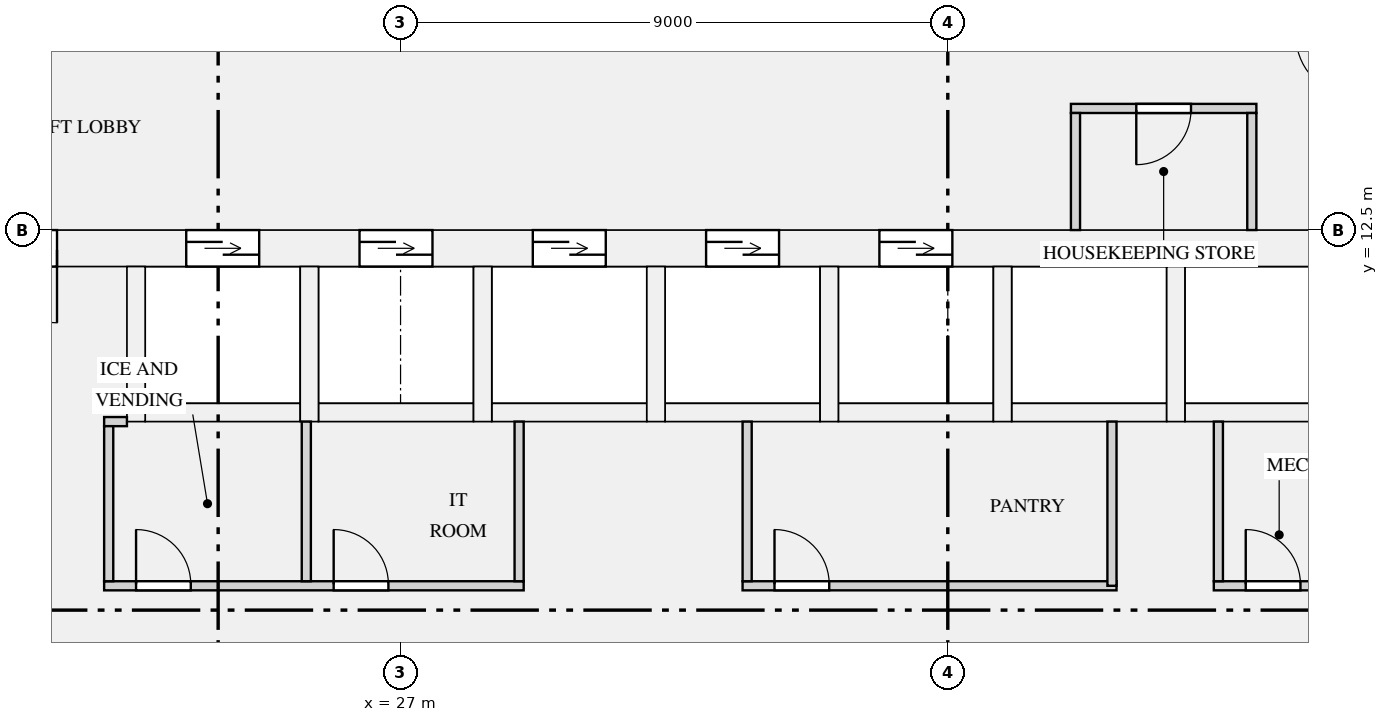
"""IFC4 building model, lengths in metres.
Left out: names, types, materials, properties, quantities, classifications, styles, units other than length and angle.
Written with IfcOpenShell. Run it as: python <this file> out.ifc"""

import sys

from ifc_helpers import new_model, si_unit, direction, frame, frame_2d, origin, place, context, subcontext, project, spatial, rectangle, extrude, element, fill, save


model = new_model("IFC4")
c1 = context("Model", 3, precision=1e-05, world=origin(), true_north=direction((0.0, 1.0)))
c2 = subcontext(c1, "Body", "Model", "MODEL_VIEW")
j1 = project(units=[si_unit("LENGTHUNIT", "METRE"), si_unit("PLANEANGLEUNIT", "RADIAN")], contexts=[c1])
p1 = place(None, origin())
s1 = spatial("IfcSite", under=j1, at=p1, CompositionType="ELEMENT")
p2 = place(p1, origin())
s2 = spatial("IfcBuilding", under=s1, at=p2, CompositionType="ELEMENT")
p3 = place(p2, frame((0.0, 0.0, 38.4)))
s3 = spatial("IfcBuildingStorey", under=s2, at=p3, CompositionType="ELEMENT", Elevation=38.4)
p4 = place(p3, frame((19.0, 12.2, 0.0), z_axis=(0.0, 0.0, 1.0), x_axis=(1.0, 0.0, 0.0)))
e1 = element("IfcWall", 1, at=p4, inside=s3, PredefinedType="SHEAR", context=c2, shape_type="SweptSolid", body=[
    extrude(rectangle(XDim=34.0, YDim=0.6, at=frame_2d((17.0, 0.0))), origin(), (0.0, 0.0, 1.0), 3.15),
])
p5 = place(p4, frame((4.475, 0.0, 0.0)))
e2 = element("IfcOpeningElement", 2, at=p5, cuts=e1, PredefinedType="OPENING", context=c2, shape_type="SweptSolid", body=[
    extrude(rectangle(XDim=1.2, YDim=2.1, at=frame_2d((0.6, 1.05))), frame((0.0, 0.31, 0.0), z_axis=(0.0, -1.0, 0.0), x_axis=(1.0, 0.0, 0.0)), (0.0, 0.0, 1.0), 0.62),
])
p6 = place(p4, frame((7.325, 0.0, 0.0)))
e3 = element("IfcOpeningElement", 3, at=p6, cuts=e1, PredefinedType="OPENING", context=c2, shape_type="SweptSolid", body=[
    extrude(rectangle(XDim=1.2, YDim=2.1, at=frame_2d((0.6, 1.05))), frame((0.0, 0.31, 0.0), z_axis=(0.0, -1.0, 0.0), x_axis=(1.0, 0.0, 0.0)), (0.0, 0.0, 1.0), 0.62),
])
p7 = place(p4, frame((10.175, 0.0, 0.0)))
e4 = element("IfcOpeningElement", 4, at=p7, cuts=e1, PredefinedType="OPENING", context=c2, shape_type="SweptSolid", body=[
    extrude(rectangle(XDim=1.2, YDim=2.1, at=frame_2d((0.6, 1.05))), frame((0.0, 0.31, 0.0), z_axis=(0.0, -1.0, 0.0), x_axis=(1.0, 0.0, 0.0)), (0.0, 0.0, 1.0), 0.62),
])
p8 = place(p4, frame((13.025, 0.0, 0.0)))
e5 = element("IfcOpeningElement", 5, at=p8, cuts=e1, PredefinedType="OPENING", context=c2, shape_type="SweptSolid", body=[
    extrude(rectangle(XDim=1.2, YDim=2.1, at=frame_2d((0.6, 1.05))), frame((0.0, 0.31, 0.0), z_axis=(0.0, -1.0, 0.0), x_axis=(1.0, 0.0, 0.0)), (0.0, 0.0, 1.0), 0.62),
])
p9 = place(p4, frame((15.875, 0.0, 0.0)))
e6 = element("IfcOpeningElement", 6, at=p9, cuts=e1, PredefinedType="OPENING", context=c2, shape_type="SweptSolid", body=[
    extrude(rectangle(XDim=1.2, YDim=2.1, at=frame_2d((0.6, 1.05))), frame((0.0, 0.31, 0.0), z_axis=(0.0, -1.0, 0.0), x_axis=(1.0, 0.0, 0.0)), (0.0, 0.0, 1.0), 0.62),
])
p10 = place(p4, frame((24.175, 0.0, 0.0)))
e7 = element("IfcOpeningElement", 7, at=p10, cuts=e1, PredefinedType="OPENING", context=c2, shape_type="SweptSolid", body=[
    extrude(rectangle(XDim=1.1, YDim=2.1, at=frame_2d((0.55, 1.05))), frame((0.0, 0.31, 0.0), z_axis=(0.0, -1.0, 0.0), x_axis=(1.0, 0.0, 0.0)), (0.0, 0.0, 1.0), 0.62),
])
p11 = place(p4, frame((26.425, 0.0, 0.0)))
e8 = element("IfcOpeningElement", 8, at=p11, cuts=e1, PredefinedType="OPENING", context=c2, shape_type="SweptSolid", body=[
    extrude(rectangle(XDim=1.1, YDim=2.1, at=frame_2d((0.55, 1.05))), frame((0.0, 0.31, 0.0), z_axis=(0.0, -1.0, 0.0), x_axis=(1.0, 0.0, 0.0)), (0.0, 0.0, 1.0), 0.62),
])
p12 = place(p4, frame((28.675, 0.0, 0.0)))
e9 = element("IfcOpeningElement", 9, at=p12, cuts=e1, PredefinedType="OPENING", context=c2, shape_type="SweptSolid", body=[
    extrude(rectangle(XDim=1.1, YDim=2.1, at=frame_2d((0.55, 1.05))), frame((0.0, 0.31, 0.0), z_axis=(0.0, -1.0, 0.0), x_axis=(1.0, 0.0, 0.0)), (0.0, 0.0, 1.0), 0.62),
])
p13 = place(p4, frame((1.15, 0.0, 0.0)))
e10 = element("IfcOpeningElement", 10, at=p13, cuts=e1, PredefinedType="OPENING", context=c2, shape_type="SweptSolid", body=[
    extrude(rectangle(XDim=1.2, YDim=2.1, at=frame_2d((0.6, 1.05))), frame((0.0, 0.31, 0.0), z_axis=(0.0, -1.0, 0.0), x_axis=(1.0, 0.0, 0.0)), (0.0, 0.0, 1.0), 0.62),
])
p14 = place(p4, frame((31.65, 0.0, 0.0)))
e11 = element("IfcOpeningElement", 11, at=p14, cuts=e1, PredefinedType="OPENING", context=c2, shape_type="SweptSolid", body=[
    extrude(rectangle(XDim=1.2, YDim=2.1, at=frame_2d((0.6, 1.05))), frame((0.0, 0.31, 0.0), z_axis=(0.0, -1.0, 0.0), x_axis=(1.0, 0.0, 0.0)), (0.0, 0.0, 1.0), 0.62),
])
p15 = place(p3, frame((22.8, 9.5, 0.0), z_axis=(0.0, 0.0, 1.0), x_axis=(1.0, 0.0, 0.0)))
e12 = element("IfcWall", 12, at=p15, inside=s3, PredefinedType="SHEAR", context=c2, shape_type="SweptSolid", body=[
    extrude(rectangle(XDim=2.55, YDim=0.3, at=frame_2d((1.275, 0.0))), origin(), (0.0, 0.0, 1.0), 3.15),
])
p16 = place(p3, frame((22.65, 9.35, 0.0), z_axis=(0.0, 0.0, 1.0), x_axis=(0.0, 1.0, 0.0)))
e13 = element("IfcWall", 13, at=p16, inside=s3, PredefinedType="SHEAR", context=c2, shape_type="SweptSolid", body=[
    extrude(rectangle(XDim=2.55, YDim=0.3, at=frame_2d((1.275, 0.0))), origin(), (0.0, 0.0, 1.0), 3.15),
])
p17 = place(p3, frame((25.65, 9.5, 0.0), z_axis=(0.0, 0.0, 1.0), x_axis=(1.0, 0.0, 0.0)))
e14 = element("IfcWall", 14, at=p17, inside=s3, PredefinedType="SHEAR", context=c2, shape_type="SweptSolid", body=[
    extrude(rectangle(XDim=2.55, YDim=0.3, at=frame_2d((1.275, 0.0))), origin(), (0.0, 0.0, 1.0), 3.15),
])
p18 = place(p3, frame((25.5, 9.35, 0.0), z_axis=(0.0, 0.0, 1.0), x_axis=(0.0, 1.0, 0.0)))
e15 = element("IfcWall", 15, at=p18, inside=s3, PredefinedType="SHEAR", context=c2, shape_type="SweptSolid", body=[
    extrude(rectangle(XDim=2.55, YDim=0.3, at=frame_2d((1.275, 0.0))), origin(), (0.0, 0.0, 1.0), 3.15),
])
p19 = place(p3, frame((28.5, 9.5, 0.0), z_axis=(0.0, 0.0, 1.0), x_axis=(1.0, 0.0, 0.0)))
e16 = element("IfcWall", 16, at=p19, inside=s3, PredefinedType="SHEAR", context=c2, shape_type="SweptSolid", body=[
    extrude(rectangle(XDim=2.55, YDim=0.3, at=frame_2d((1.275, 0.0))), origin(), (0.0, 0.0, 1.0), 3.15),
])
for number, where, z_axis, x_axis in (
    (17, (28.35, 9.35, 0.0), (0.0, 0.0, 1.0), (0.0, 1.0, 0.0)),
    (18, (31.35, 9.5, 0.0), (0.0, 0.0, 1.0), (1.0, 0.0, 0.0)),
    (19, (31.2, 9.35, 0.0), (0.0, 0.0, 1.0), (0.0, 1.0, 0.0)),
):
    element("IfcWall", number, at=place(p3, frame(where, z_axis=z_axis, x_axis=x_axis)), inside=s3, PredefinedType="SHEAR", context=c2, shape_type="SweptSolid", body=[
        extrude(rectangle(XDim=2.55, YDim=0.3, at=frame_2d((1.275, 0.0))), origin(), (0.0, 0.0, 1.0), 3.15),
    ])
p20 = place(p3, frame((34.2, 9.5, 0.0), z_axis=(0.0, 0.0, 1.0), x_axis=(1.0, 0.0, 0.0)))
e20 = element("IfcWall", 20, at=p20, inside=s3, PredefinedType="SHEAR", context=c2, shape_type="SweptSolid", body=[
    extrude(rectangle(XDim=2.55, YDim=0.3, at=frame_2d((1.275, 0.0))), origin(), (0.0, 0.0, 1.0), 3.15),
])
p21 = place(p3, frame((34.05, 9.35, 0.0), z_axis=(0.0, 0.0, 1.0), x_axis=(0.0, 1.0, 0.0)))
e21 = element("IfcWall", 21, at=p21, inside=s3, PredefinedType="SHEAR", context=c2, shape_type="SweptSolid", body=[
    extrude(rectangle(XDim=2.55, YDim=0.3, at=frame_2d((1.275, 0.0))), origin(), (0.0, 0.0, 1.0), 3.15),
])
p22 = place(p3, frame((37.05, 9.5, 0.0), z_axis=(0.0, 0.0, 1.0), x_axis=(1.0, 0.0, 0.0)))
e22 = element("IfcWall", 22, at=p22, inside=s3, PredefinedType="SHEAR", context=c2, shape_type="SweptSolid", body=[
    extrude(rectangle(XDim=2.55, YDim=0.3, at=frame_2d((1.275, 0.0))), origin(), (0.0, 0.0, 1.0), 3.15),
])
p23 = place(p3, frame((36.9, 9.35, 0.0), z_axis=(0.0, 0.0, 1.0), x_axis=(0.0, 1.0, 0.0)))
e23 = element("IfcWall", 23, at=p23, inside=s3, PredefinedType="SHEAR", context=c2, shape_type="SweptSolid", body=[
    extrude(rectangle(XDim=2.55, YDim=0.3, at=frame_2d((1.275, 0.0))), origin(), (0.0, 0.0, 1.0), 3.15),
])
p24 = place(p3, frame((39.9, 9.5, 0.0), z_axis=(0.0, 0.0, 1.0), x_axis=(1.0, 0.0, 0.0)))
e24 = element("IfcWall", 24, at=p24, inside=s3, PredefinedType="SHEAR", context=c2, shape_type="SweptSolid", body=[
    extrude(rectangle(XDim=2.55, YDim=0.3, at=frame_2d((1.275, 0.0))), origin(), (0.0, 0.0, 1.0), 3.15),
])
p25 = place(p3, frame((39.75, 9.35, 0.0), z_axis=(0.0, 0.0, 1.0), x_axis=(0.0, 1.0, 0.0)))
e25 = element("IfcWall", 25, at=p25, inside=s3, PredefinedType="SHEAR", context=c2, shape_type="SweptSolid", body=[
    extrude(rectangle(XDim=2.55, YDim=0.3, at=frame_2d((1.275, 0.0))), origin(), (0.0, 0.0, 1.0), 3.15),
])
p26 = place(p3, frame((22.125, 6.65, 0.0), z_axis=(0.0, 0.0, 1.0), x_axis=(1.0, 0.0, 0.0)))
e26 = element("IfcWall", 26, at=p26, inside=s3, PredefinedType="PARTITIONING", context=c2, shape_type="SweptSolid", body=[
    extrude(rectangle(XDim=6.9, YDim=0.15, at=frame_2d((3.45, 0.0))), origin(), (0.0, 0.0, 1.0), 2.83),
])
p27 = place(p26, frame((0.525, 0.0, 0.0)))
e27 = element("IfcOpeningElement", 27, at=p27, cuts=e26, PredefinedType="OPENING", context=c2, shape_type="SweptSolid", body=[
    extrude(rectangle(XDim=0.9, YDim=2.1, at=frame_2d((0.45, 1.05))), frame((0.0, 0.085, 0.0), z_axis=(0.0, -1.0, 0.0), x_axis=(1.0, 0.0, 0.0)), (0.0, 0.0, 1.0), 0.17),
])
p28 = place(p26, frame((3.775, 0.0, 0.0)))
e28 = element("IfcOpeningElement", 28, at=p28, cuts=e26, PredefinedType="OPENING", context=c2, shape_type="SweptSolid", body=[
    extrude(rectangle(XDim=0.9, YDim=2.1, at=frame_2d((0.45, 1.05))), frame((0.0, 0.085, 0.0), z_axis=(0.0, -1.0, 0.0), x_axis=(1.0, 0.0, 0.0)), (0.0, 0.0, 1.0), 0.17),
])
p29 = place(p3, frame((32.625, 6.65, 0.0), z_axis=(0.0, 0.0, 1.0), x_axis=(1.0, 0.0, 0.0)))
e29 = element("IfcWall", 29, at=p29, inside=s3, PredefinedType="PARTITIONING", context=c2, shape_type="SweptSolid", body=[
    extrude(rectangle(XDim=6.15, YDim=0.15, at=frame_2d((3.075, 0.0))), origin(), (0.0, 0.0, 1.0), 2.83),
])
p30 = place(p29, frame((0.525, 0.0, 0.0)))
e30 = element("IfcOpeningElement", 30, at=p30, cuts=e29, PredefinedType="OPENING", context=c2, shape_type="SweptSolid", body=[
    extrude(rectangle(XDim=0.9, YDim=2.1, at=frame_2d((0.45, 1.05))), frame((0.0, 0.085, 0.0), z_axis=(0.0, -1.0, 0.0), x_axis=(1.0, 0.0, 0.0)), (0.0, 0.0, 1.0), 0.17),
])
p31 = place(p3, frame((40.375, 6.65, 0.0), z_axis=(0.0, 0.0, 1.0), x_axis=(1.0, 0.0, 0.0)))
e31 = element("IfcWall", 31, at=p31, inside=s3, PredefinedType="PARTITIONING", context=c2, shape_type="SweptSolid", body=[
    extrude(rectangle(XDim=2.15, YDim=0.15, at=frame_2d((1.075, 0.0))), origin(), (0.0, 0.0, 1.0), 2.83),
])
p32 = place(p31, frame((0.525, 0.0, 0.0)))
e32 = element("IfcOpeningElement", 32, at=p32, cuts=e31, PredefinedType="OPENING", context=c2, shape_type="SweptSolid", body=[
    extrude(rectangle(XDim=0.9, YDim=2.1, at=frame_2d((0.45, 1.05))), frame((0.0, 0.085, 0.0), z_axis=(0.0, -1.0, 0.0), x_axis=(1.0, 0.0, 0.0)), (0.0, 0.0, 1.0), 0.17),
])
p33 = place(p3, frame((22.125, 9.35, 0.0), z_axis=(0.0, 0.0, 1.0), x_axis=(1.0, 0.0, 0.0)))
e33 = element("IfcWall", 33, at=p33, inside=s3, PredefinedType="PARTITIONING", context=c2, shape_type="SweptSolid", body=[
    extrude(rectangle(XDim=0.375, YDim=0.15, at=frame_2d((0.188, 0.0))), origin(), (0.0, 0.0, 1.0), 2.83),
])
p34 = place(p3, frame((38.025, 14.5, 0.0), z_axis=(0.0, 0.0, 1.0), x_axis=(1.0, 0.0, 0.0)))
e34 = element("IfcWall", 34, at=p34, inside=s3, PredefinedType="PARTITIONING", context=c2, shape_type="SweptSolid", body=[
    extrude(rectangle(XDim=3.05, YDim=0.15, at=frame_2d((1.525, 0.0))), origin(), (0.0, 0.0, 1.0), 2.83),
])
p35 = place(p34, frame((1.075, 0.0, 0.0)))
e35 = element("IfcOpeningElement", 35, at=p35, cuts=e34, PredefinedType="OPENING", context=c2, shape_type="SweptSolid", body=[
    extrude(rectangle(XDim=0.9, YDim=2.1, at=frame_2d((0.45, 1.05))), frame((0.0, 0.085, 0.0), z_axis=(0.0, -1.0, 0.0), x_axis=(1.0, 0.0, 0.0)), (0.0, 0.0, 1.0), 0.17),
])
p36 = place(p3, frame((38.7, 6.65, 0.0), z_axis=(0.0, 0.0, 1.0), x_axis=(0.0, 1.0, 0.0)))
e36 = element("IfcWall", 36, at=p36, inside=s3, PredefinedType="PARTITIONING", context=c2, shape_type="SweptSolid", body=[
    extrude(rectangle(XDim=2.7, YDim=0.15, at=frame_2d((1.35, 0.0))), origin(), (0.0, 0.0, 1.0), 2.83),
])
p37 = place(p3, frame((22.2, 6.725, 0.0), z_axis=(0.0, 0.0, 1.0), x_axis=(0.0, 1.0, 0.0)))
e37 = element("IfcWall", 37, at=p37, inside=s3, PredefinedType="PARTITIONING", context=c2, shape_type="SweptSolid", body=[
    extrude(rectangle(XDim=2.55, YDim=0.15, at=frame_2d((1.275, 0.0))), origin(), (0.0, 0.0, 1.0), 2.83),
])
for number, where, z_axis, x_axis in (
    (38, (25.45, 6.725, 0.0), (0.0, 0.0, 1.0), (0.0, 1.0, 0.0)),
    (39, (28.95, 6.725, 0.0), (0.0, 0.0, 1.0), (0.0, 1.0, 0.0)),
    (40, (32.7, 6.725, 0.0), (0.0, 0.0, 1.0), (0.0, 1.0, 0.0)),
    (41, (40.45, 6.725, 0.0), (0.0, 0.0, 1.0), (0.0, 1.0, 0.0)),
):
    element("IfcWall", number, at=place(p3, frame(where, z_axis=z_axis, x_axis=x_axis)), inside=s3, PredefinedType="PARTITIONING", context=c2, shape_type="SweptSolid", body=[
        extrude(rectangle(XDim=2.625, YDim=0.15, at=frame_2d((1.312, 0.0))), origin(), (0.0, 0.0, 1.0), 2.83),
    ])
for number, where, z_axis, x_axis in (
    (42, (38.1, 12.5, 0.0), (0.0, 0.0, 1.0), (0.0, 1.0, 0.0)),
    (43, (41.0, 12.5, 0.0), (0.0, 0.0, 1.0), (0.0, 1.0, 0.0)),
):
    element("IfcWall", number, at=place(p3, frame(where, z_axis=z_axis, x_axis=x_axis)), inside=s3, PredefinedType="PARTITIONING", context=c2, shape_type="SweptSolid", body=[
        extrude(rectangle(XDim=1.925, YDim=0.15, at=frame_2d((0.962, 0.0))), origin(), (0.0, 0.0, 1.0), 2.83),
    ])
p38 = place(p5, origin())
e44 = element("IfcDoor", 44, at=p38, inside=s3, OperationType="DOUBLE_DOOR_SLIDING", PredefinedType="DOOR", context=c2, shape_type="SweptSolid", body=[
    extrude(rectangle(XDim=1.2, YDim=2.1, at=frame_2d((0.6, 1.05))), frame((0.0, 0.025, 0.0), z_axis=(0.0, -1.0, 0.0), x_axis=(1.0, 0.0, 0.0)), (0.0, 0.0, 1.0), 0.05),
])
fill(e2, e44)
p39 = place(p6, origin())
e45 = element("IfcDoor", 45, at=p39, inside=s3, OperationType="DOUBLE_DOOR_SLIDING", PredefinedType="DOOR", context=c2, shape_type="SweptSolid", body=[
    extrude(rectangle(XDim=1.2, YDim=2.1, at=frame_2d((0.6, 1.05))), frame((0.0, 0.025, 0.0), z_axis=(0.0, -1.0, 0.0), x_axis=(1.0, 0.0, 0.0)), (0.0, 0.0, 1.0), 0.05),
])
fill(e3, e45)
p40 = place(p7, origin())
e46 = element("IfcDoor", 46, at=p40, inside=s3, OperationType="DOUBLE_DOOR_SLIDING", PredefinedType="DOOR", context=c2, shape_type="SweptSolid", body=[
    extrude(rectangle(XDim=1.2, YDim=2.1, at=frame_2d((0.6, 1.05))), frame((0.0, 0.025, 0.0), z_axis=(0.0, -1.0, 0.0), x_axis=(1.0, 0.0, 0.0)), (0.0, 0.0, 1.0), 0.05),
])
fill(e4, e46)
p41 = place(p8, origin())
e47 = element("IfcDoor", 47, at=p41, inside=s3, OperationType="DOUBLE_DOOR_SLIDING", PredefinedType="DOOR", context=c2, shape_type="SweptSolid", body=[
    extrude(rectangle(XDim=1.2, YDim=2.1, at=frame_2d((0.6, 1.05))), frame((0.0, 0.025, 0.0), z_axis=(0.0, -1.0, 0.0), x_axis=(1.0, 0.0, 0.0)), (0.0, 0.0, 1.0), 0.05),
])
fill(e5, e47)
p42 = place(p9, origin())
e48 = element("IfcDoor", 48, at=p42, inside=s3, OperationType="DOUBLE_DOOR_SLIDING", PredefinedType="DOOR", context=c2, shape_type="SweptSolid", body=[
    extrude(rectangle(XDim=1.2, YDim=2.1, at=frame_2d((0.6, 1.05))), frame((0.0, 0.025, 0.0), z_axis=(0.0, -1.0, 0.0), x_axis=(1.0, 0.0, 0.0)), (0.0, 0.0, 1.0), 0.05),
])
fill(e6, e48)
p43 = place(p27, origin())
e49 = element("IfcDoor", 49, at=p43, inside=s3, OperationType="SINGLE_SWING_LEFT", PredefinedType="DOOR", context=c2, shape_type="SweptSolid", body=[
    extrude(rectangle(XDim=0.9, YDim=2.1, at=frame_2d((0.45, 1.05))), frame((0.0, 0.025, 0.0), z_axis=(0.0, -1.0, 0.0), x_axis=(1.0, 0.0, 0.0)), (0.0, 0.0, 1.0), 0.05),
])
fill(e27, e49)
p44 = place(p28, origin())
e50 = element("IfcDoor", 50, at=p44, inside=s3, OperationType="SINGLE_SWING_LEFT", PredefinedType="DOOR", context=c2, shape_type="SweptSolid", body=[
    extrude(rectangle(XDim=0.9, YDim=2.1, at=frame_2d((0.45, 1.05))), frame((0.0, 0.025, 0.0), z_axis=(0.0, -1.0, 0.0), x_axis=(1.0, 0.0, 0.0)), (0.0, 0.0, 1.0), 0.05),
])
fill(e28, e50)
p45 = place(p30, origin())
e51 = element("IfcDoor", 51, at=p45, inside=s3, OperationType="SINGLE_SWING_LEFT", PredefinedType="DOOR", context=c2, shape_type="SweptSolid", body=[
    extrude(rectangle(XDim=0.9, YDim=2.1, at=frame_2d((0.45, 1.05))), frame((0.0, 0.025, 0.0), z_axis=(0.0, -1.0, 0.0), x_axis=(1.0, 0.0, 0.0)), (0.0, 0.0, 1.0), 0.05),
])
fill(e30, e51)
p46 = place(p32, origin())
e52 = element("IfcDoor", 52, at=p46, inside=s3, OperationType="SINGLE_SWING_LEFT", PredefinedType="DOOR", context=c2, shape_type="SweptSolid", body=[
    extrude(rectangle(XDim=0.9, YDim=2.1, at=frame_2d((0.45, 1.05))), frame((0.0, 0.025, 0.0), z_axis=(0.0, -1.0, 0.0), x_axis=(1.0, 0.0, 0.0)), (0.0, 0.0, 1.0), 0.05),
])
fill(e32, e52)
p47 = place(p35, frame((0.9, 0.0, 0.0), z_axis=(0.0, 0.0, 1.0), x_axis=(-1.0, 0.0, 0.0)))
e53 = element("IfcDoor", 53, at=p47, inside=s3, OperationType="SINGLE_SWING_RIGHT", PredefinedType="DOOR", context=c2, shape_type="SweptSolid", body=[
    extrude(rectangle(XDim=0.9, YDim=2.1, at=frame_2d((0.45, 1.05))), frame((0.0, 0.025, 0.0), z_axis=(0.0, -1.0, 0.0), x_axis=(1.0, 0.0, 0.0)), (0.0, 0.0, 1.0), 0.05),
])
fill(e35, e53)
p48 = place(p13, frame((1.2, 0.0, 0.0), z_axis=(0.0, 0.0, 1.0), x_axis=(-1.0, 0.0, 0.0)))
e54 = element("IfcDoor", 54, at=p48, inside=s3, OperationType="SINGLE_SWING_LEFT", PredefinedType="DOOR", context=c2, shape_type="SweptSolid", body=[
    extrude(rectangle(XDim=1.2, YDim=2.1, at=frame_2d((0.6, 1.05))), frame((0.0, 0.025, 0.0), z_axis=(0.0, -1.0, 0.0), x_axis=(1.0, 0.0, 0.0)), (0.0, 0.0, 1.0), 0.05),
])
fill(e10, e54)
save(model, sys.argv[1])
